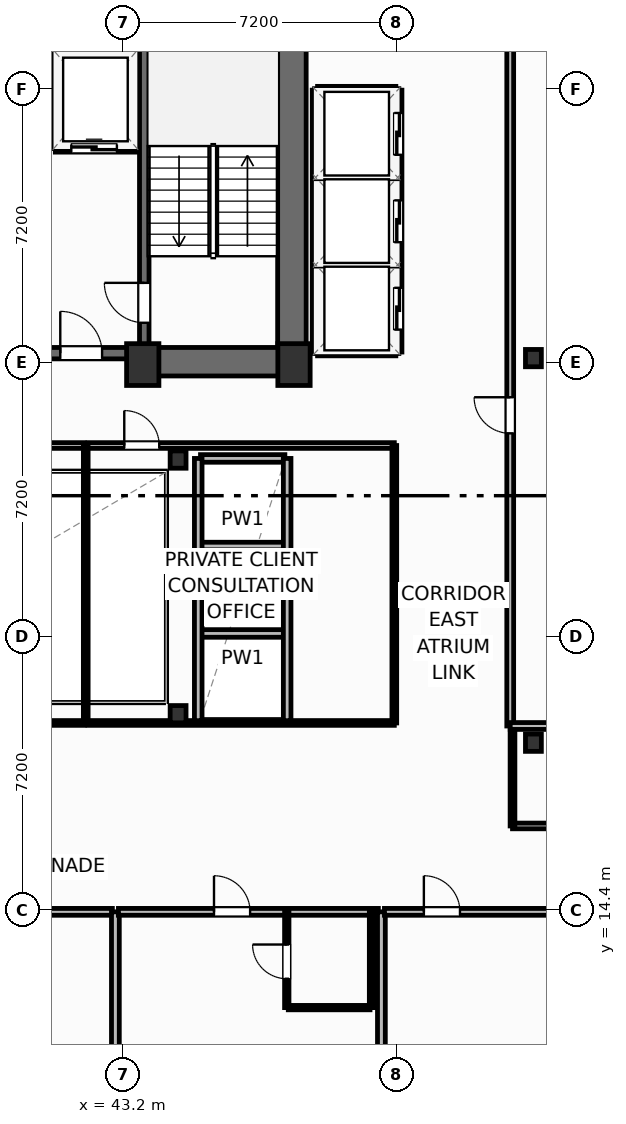
"""IFC4 building model, lengths in metres.
Left out: names, types, materials, properties, quantities, classifications, styles, units other than length and angle.
Written with IfcOpenShell. Run it as: python <this file> out.ifc"""

import sys

from ifc_helpers import new_model, si_unit, direction, frame, frame_2d, origin, origin_2d, place, context, subcontext, project, spatial, rectangle, i_section, extrude, element, fill, save


model = new_model("IFC4")
c1 = context("Model", 3, precision=1e-05, world=origin(), true_north=direction((0.0, 1.0)))
c2 = subcontext(c1, "Body", "Model", "MODEL_VIEW")
j1 = project(units=[si_unit("LENGTHUNIT", "METRE"), si_unit("PLANEANGLEUNIT", "RADIAN")], contexts=[c1])
p1 = place(None, origin())
s1 = spatial("IfcSite", under=j1, at=p1, CompositionType="ELEMENT")
p2 = place(p1, origin())
s2 = spatial("IfcBuilding", under=s1, at=p2, CompositionType="ELEMENT")
p3 = place(p2, frame((0.0, 0.0, 158.7)))
s3 = spatial("IfcBuildingStorey", under=s2, at=p3, CompositionType="ELEMENT", Elevation=158.7)
for number, where, z_axis, x_axis in (
    (1, (43.72, 28.75, 0.0), (0.0, 0.0, 1.0), (1.0, 0.0, 0.0)),
    (2, (47.7, 28.75, 0.0), (0.0, 0.0, 1.0), (1.0, 0.0, 0.0)),
):
    element("IfcColumn", number, at=place(p3, frame(where, z_axis=z_axis, x_axis=x_axis)), inside=s3, PredefinedType="COLUMN", context=c2, shape_type="SweptSolid", body=[
        extrude(rectangle(XDim=0.85, YDim=1.1, at=origin_2d()), origin(), (0.0, 0.0, 1.0), 3.7),
    ])
for number, where, z_axis, x_axis in (
    (3, (44.65, 19.55, 0.0), (0.0, 0.0, 1.0), (1.0, 0.0, 0.0)),
    (4, (44.65, 26.25, 0.0), (0.0, 0.0, 1.0), (1.0, 0.0, 0.0)),
    (5, (54.0, 18.8, 0.0), (0.0, 0.0, 1.0), (1.0, 0.0, 0.0)),
    (6, (54.0, 28.92, 0.0), (0.0, 0.0, 1.0), (1.0, 0.0, 0.0)),
):
    element("IfcColumn", number, at=place(p3, frame(where, z_axis=z_axis, x_axis=x_axis)), inside=s3, PredefinedType="COLUMN", context=c2, shape_type="SweptSolid", body=[
        extrude(i_section(OverallWidth=0.418, OverallDepth=0.455, WebThickness=0.042, FlangeThickness=0.068, FilletRadius=0.025, at=origin_2d()), origin(), (0.0, 0.0, 1.0), 3.7),
    ])
p4 = place(p3, frame((47.645, 29.2, 0.0), z_axis=(0.0, 0.0, 1.0), x_axis=(0.0, 1.0, 0.0)))
e7 = element("IfcWall", 7, at=p4, inside=s3, PredefinedType="SHEAR", context=c2, shape_type="SweptSolid", body=[
    extrude(rectangle(XDim=9.22, YDim=0.75, at=frame_2d((4.61, 0.0))), origin(), (0.0, 0.0, 1.0), 3.38),
])
p5 = place(p3, frame((43.6, 28.825, 0.0), z_axis=(0.0, 0.0, 1.0), x_axis=(1.0, 0.0, 0.0)))
e8 = element("IfcWall", 8, at=p5, inside=s3, PredefinedType="SHEAR", context=c2, shape_type="SweptSolid", body=[
    extrude(rectangle(XDim=4.42, YDim=0.75, at=frame_2d((2.21, 0.0))), origin(), (0.0, 0.0, 1.0), 3.38),
])
p6 = place(p3, frame((34.8, 29.05, 0.0), z_axis=(0.0, 0.0, 1.0), x_axis=(1.0, 0.0, 0.0)))
e9 = element("IfcWall", 9, at=p6, inside=s3, PredefinedType="SHEAR", context=c2, shape_type="SweptSolid", body=[
    extrude(rectangle(XDim=8.8, YDim=0.3, at=frame_2d((4.4, 0.0))), origin(), (0.0, 0.0, 1.0), 3.38),
])
p7 = place(p6, frame((0.95, 0.0, 0.0)))
e10 = element("IfcOpeningElement", 10, at=p7, cuts=e9, PredefinedType="OPENING", context=c2, shape_type="SweptSolid", body=[
    extrude(rectangle(XDim=1.1, YDim=2.15, at=frame_2d((0.55, 1.075))), frame((0.0, 0.16, 0.0), z_axis=(0.0, -1.0, 0.0), x_axis=(1.0, 0.0, 0.0)), (0.0, 0.0, 1.0), 0.32),
])
p8 = place(p6, frame((6.75, 0.0, 0.0)))
e11 = element("IfcOpeningElement", 11, at=p8, cuts=e9, PredefinedType="OPENING", context=c2, shape_type="SweptSolid", body=[
    extrude(rectangle(XDim=1.1, YDim=2.15, at=frame_2d((0.55, 1.075))), frame((0.0, 0.16, 0.0), z_axis=(0.0, -1.0, 0.0), x_axis=(1.0, 0.0, 0.0)), (0.0, 0.0, 1.0), 0.32),
])
p9 = place(p6, frame((4.45, 0.0, 0.0)))
e12 = element("IfcOpeningElement", 12, at=p9, cuts=e9, PredefinedType="OPENING", context=c2, shape_type="SweptSolid", body=[
    extrude(rectangle(XDim=0.95, YDim=2.15, at=frame_2d((0.475, 1.075))), frame((0.0, 0.16, 0.0), z_axis=(0.0, -1.0, 0.0), x_axis=(1.0, 0.0, 0.0)), (0.0, 0.0, 1.0), 0.32),
])
p10 = place(p3, frame((43.76, 29.2, 0.0), z_axis=(0.0, 0.0, 1.0), x_axis=(0.0, 1.0, 0.0)))
e13 = element("IfcWall", 13, at=p10, inside=s3, PredefinedType="SHEAR", context=c2, shape_type="SweptSolid", body=[
    extrude(rectangle(XDim=9.22, YDim=0.25, at=frame_2d((4.61, 0.0))), origin(), (0.0, 0.0, 1.0), 3.38),
])
p11 = place(p10, frame((0.65, 0.0, 0.0)))
e14 = element("IfcOpeningElement", 14, at=p11, cuts=e13, PredefinedType="OPENING", context=c2, shape_type="SweptSolid", body=[
    extrude(rectangle(XDim=1.05, YDim=2.15, at=frame_2d((0.525, 1.075))), frame((0.0, 0.135, 0.0), z_axis=(0.0, -1.0, 0.0), x_axis=(1.0, 0.0, 0.0)), (0.0, 0.0, 1.0), 0.27),
])
p12 = place(p3, frame((33.68, 26.62, 0.0), z_axis=(0.0, 0.0, 1.0), x_axis=(1.0, 0.0, 0.0)))
e15 = element("IfcWall", 15, at=p12, inside=s3, PredefinedType="PARTITIONING", context=c2, shape_type="SweptSolid", body=[
    extrude(rectangle(XDim=8.5, YDim=0.15, at=frame_2d((4.25, 0.0))), origin(), (0.0, 0.0, 1.0), 3.38),
])
p13 = place(p12, frame((1.85, 0.0, 0.0)))
e16 = element("IfcOpeningElement", 16, at=p13, cuts=e15, PredefinedType="OPENING", context=c2, shape_type="SweptSolid", body=[
    extrude(rectangle(XDim=0.92, YDim=2.05, at=frame_2d((0.46, 1.025))), frame((0.0, 0.085, 0.0), z_axis=(0.0, -1.0, 0.0), x_axis=(1.0, 0.0, 0.0)), (0.0, 0.0, 1.0), 0.17),
])
p14 = place(p3, frame((33.68, 19.32, 0.0), z_axis=(0.0, 0.0, 1.0), x_axis=(1.0, 0.0, 0.0)))
e17 = element("IfcWall", 17, at=p14, inside=s3, PredefinedType="PARTITIONING", context=c2, shape_type="SweptSolid", body=[
    extrude(rectangle(XDim=8.5, YDim=0.125, at=frame_2d((4.25, 0.0))), origin(), (0.0, 0.0, 1.0), 2.754),
])
p15 = place(p3, frame((42.22, 19.32, 0.0), z_axis=(0.0, 0.0, 1.0), x_axis=(0.0, 1.0, 0.0)))
e18 = element("IfcWall", 18, at=p15, inside=s3, PredefinedType="PARTITIONING", context=c2, shape_type="SweptSolid", body=[
    extrude(rectangle(XDim=7.3, YDim=0.125, at=frame_2d((3.65, 0.0))), origin(), (0.0, 0.0, 1.0), 3.38),
])
p16 = place(p3, frame((42.28, 26.62, 0.0), z_axis=(0.0, 0.0, 1.0), x_axis=(1.0, 0.0, 0.0)))
e19 = element("IfcWall", 19, at=p16, inside=s3, PredefinedType="PARTITIONING", context=c2, shape_type="SweptSolid", body=[
    extrude(rectangle(XDim=8.06, YDim=0.15, at=frame_2d((4.03, 0.0))), origin(), (0.0, 0.0, 1.0), 3.38),
])
p17 = place(p16, frame((0.954, 0.0, 0.0)))
e20 = element("IfcOpeningElement", 20, at=p17, cuts=e19, PredefinedType="OPENING", context=c2, shape_type="SweptSolid", body=[
    extrude(rectangle(XDim=0.92, YDim=2.05, at=frame_2d((0.46, 1.025))), frame((0.0, 0.085, 0.0), z_axis=(0.0, -1.0, 0.0), x_axis=(1.0, 0.0, 0.0)), (0.0, 0.0, 1.0), 0.17),
])
p18 = place(p3, frame((42.28, 19.32, 0.0), z_axis=(0.0, 0.0, 1.0), x_axis=(1.0, 0.0, 0.0)))
e21 = element("IfcWall", 21, at=p18, inside=s3, PredefinedType="PARTITIONING", context=c2, shape_type="SweptSolid", body=[
    extrude(rectangle(XDim=8.06, YDim=0.125, at=frame_2d((4.03, 0.0))), origin(), (0.0, 0.0, 1.0), 2.592),
])
p19 = place(p3, frame((50.34, 19.32, 0.0), z_axis=(0.0, 0.0, 1.0), x_axis=(0.0, 1.0, 0.0)))
e22 = element("IfcWall", 22, at=p19, inside=s3, PredefinedType="PARTITIONING", context=c2, shape_type="SweptSolid", body=[
    extrude(rectangle(XDim=7.3, YDim=0.125, at=frame_2d((3.65, 0.0))), origin(), (0.0, 0.0, 1.0), 3.38),
])
p20 = place(p3, frame((53.45, 16.61, 0.0), z_axis=(0.0, 0.0, 1.0), x_axis=(1.0, 0.0, 0.0)))
e23 = element("IfcWall", 23, at=p20, inside=s3, PredefinedType="PARTITIONING", context=c2, shape_type="SweptSolid", body=[
    extrude(rectangle(XDim=16.55, YDim=0.15, at=frame_2d((8.275, 0.0))), origin(), (0.0, 0.0, 1.0), 3.38),
])
p21 = place(p20, frame((2.61, 0.0, 0.0)))
e24 = element("IfcOpeningElement", 24, at=p21, cuts=e23, PredefinedType="OPENING", context=c2, shape_type="SweptSolid", body=[
    extrude(rectangle(XDim=0.92, YDim=2.05, at=frame_2d((0.46, 1.025))), frame((0.0, 0.085, 0.0), z_axis=(0.0, -1.0, 0.0), x_axis=(1.0, 0.0, 0.0)), (0.0, 0.0, 1.0), 0.17),
])
p22 = place(p3, frame((53.45, 16.61, 0.0), z_axis=(0.0, 0.0, 1.0), x_axis=(0.0, 1.0, 0.0)))
e25 = element("IfcWall", 25, at=p22, inside=s3, PredefinedType="PARTITIONING", context=c2, shape_type="SweptSolid", body=[
    extrude(rectangle(XDim=2.63, YDim=0.125, at=frame_2d((1.315, 0.0))), origin(), (0.0, 0.0, 1.0), 1.165),
])
p23 = place(p3, frame((36.08, 14.35, 0.0), z_axis=(0.0, 0.0, 1.0), x_axis=(1.0, 0.0, 0.0)))
e26 = element("IfcWall", 26, at=p23, inside=s3, PredefinedType="PARTITIONING", context=c2, shape_type="SweptSolid", body=[
    extrude(rectangle(XDim=6.84, YDim=0.18, at=frame_2d((3.42, 0.0))), origin(), (0.0, 0.0, 1.0), 3.38),
])
p24 = place(p23, frame((3.29, 0.0, 0.0)))
e27 = element("IfcOpeningElement", 27, at=p24, cuts=e26, PredefinedType="OPENING", context=c2, shape_type="SweptSolid", body=[
    extrude(rectangle(XDim=0.95, YDim=2.15, at=frame_2d((0.475, 1.075))), frame((0.0, 0.1, 0.0), z_axis=(0.0, -1.0, 0.0), x_axis=(1.0, 0.0, 0.0)), (0.0, 0.0, 1.0), 0.2),
])
p25 = place(p3, frame((43.0, 2.934, 0.0), z_axis=(0.0, 0.0, 1.0), x_axis=(0.0, 1.0, 0.0)))
e28 = element("IfcWall", 28, at=p25, inside=s3, PredefinedType="PARTITIONING", context=c2, shape_type="SweptSolid", body=[
    extrude(rectangle(XDim=11.416, YDim=0.205, at=frame_2d((5.708, 0.0))), origin(), (0.0, 0.0, 1.0), 1.165),
])
p26 = place(p3, frame((43.08, 14.35, 0.0), z_axis=(0.0, 0.0, 1.0), x_axis=(1.0, 0.0, 0.0)))
e29 = element("IfcWall", 29, at=p26, inside=s3, PredefinedType="PARTITIONING", context=c2, shape_type="SweptSolid", body=[
    extrude(rectangle(XDim=6.84, YDim=0.18, at=frame_2d((3.42, 0.0))), origin(), (0.0, 0.0, 1.0), 3.38),
])
p27 = place(p26, frame((2.515, 0.0, 0.0)))
e30 = element("IfcOpeningElement", 30, at=p27, cuts=e29, PredefinedType="OPENING", context=c2, shape_type="SweptSolid", body=[
    extrude(rectangle(XDim=0.95, YDim=2.15, at=frame_2d((0.475, 1.075))), frame((0.0, 0.1, 0.0), z_axis=(0.0, -1.0, 0.0), x_axis=(1.0, 0.0, 0.0)), (0.0, 0.0, 1.0), 0.2),
])
p28 = place(p3, frame((47.55, 11.83, 0.0), z_axis=(0.0, 0.0, 1.0), x_axis=(1.0, 0.0, 0.0)))
e31 = element("IfcWall", 31, at=p28, inside=s3, PredefinedType="PARTITIONING", context=c2, shape_type="SweptSolid", body=[
    extrude(rectangle(XDim=2.15, YDim=0.115, at=frame_2d((1.075, 0.0))), origin(), (0.0, 0.0, 1.0), 3.38),
])
p29 = place(p3, frame((47.51, 11.83, 0.0), z_axis=(0.0, 0.0, 1.0), x_axis=(0.0, 1.0, 0.0)))
e32 = element("IfcWall", 32, at=p29, inside=s3, PredefinedType="PARTITIONING", context=c2, shape_type="SweptSolid", body=[
    extrude(rectangle(XDim=2.52, YDim=0.115, at=frame_2d((1.26, 0.0))), origin(), (0.0, 0.0, 1.0), 3.38),
])
p30 = place(p29, frame((0.76, 0.0, 0.0)))
e33 = element("IfcOpeningElement", 33, at=p30, cuts=e32, PredefinedType="OPENING", context=c2, shape_type="SweptSolid", body=[
    extrude(rectangle(XDim=0.9, YDim=2.05, at=frame_2d((0.45, 1.025))), frame((0.0, 0.067, 0.0), z_axis=(0.0, -1.0, 0.0), x_axis=(1.0, 0.0, 0.0)), (0.0, 0.0, 1.0), 0.135),
])
p31 = place(p3, frame((49.74, 11.83, 0.0), z_axis=(0.0, 0.0, 1.0), x_axis=(0.0, 1.0, 0.0)))
e34 = element("IfcWall", 34, at=p31, inside=s3, PredefinedType="PARTITIONING", context=c2, shape_type="SweptSolid", body=[
    extrude(rectangle(XDim=2.52, YDim=0.115, at=frame_2d((1.26, 0.0))), origin(), (0.0, 0.0, 1.0), 3.38),
])
p32 = place(p3, frame((50.0, 0.561, 0.0), z_axis=(0.0, 0.0, 1.0), x_axis=(0.0, 1.0, 0.0)))
e35 = element("IfcWall", 35, at=p32, inside=s3, PredefinedType="PARTITIONING", context=c2, shape_type="SweptSolid", body=[
    extrude(rectangle(XDim=13.79, YDim=0.205, at=frame_2d((6.895, 0.0))), origin(), (0.0, 0.0, 1.0), 1.165),
])
p33 = place(p3, frame((50.08, 14.35, 0.0), z_axis=(0.0, 0.0, 1.0), x_axis=(1.0, 0.0, 0.0)))
e36 = element("IfcWall", 36, at=p33, inside=s3, PredefinedType="PARTITIONING", context=c2, shape_type="SweptSolid", body=[
    extrude(rectangle(XDim=6.84, YDim=0.18, at=frame_2d((3.42, 0.0))), origin(), (0.0, 0.0, 1.0), 3.38),
])
p34 = place(p33, frame((1.038, 0.0, 0.0)))
e37 = element("IfcOpeningElement", 37, at=p34, cuts=e36, PredefinedType="OPENING", context=c2, shape_type="SweptSolid", body=[
    extrude(rectangle(XDim=0.95, YDim=2.05, at=frame_2d((0.475, 1.025))), frame((0.0, 0.1, 0.0), z_axis=(0.0, -1.0, 0.0), x_axis=(1.0, 0.0, 0.0)), (0.0, 0.0, 1.0), 0.2),
])
p35 = place(p3, frame((53.39, 19.24, 0.0), z_axis=(0.0, 0.0, 1.0), x_axis=(0.0, 1.0, 0.0)))
e38 = element("IfcWall", 38, at=p35, inside=s3, PredefinedType="PARTITIONING", context=c2, shape_type="SweptSolid", body=[
    extrude(rectangle(XDim=20.06, YDim=0.18, at=frame_2d((10.03, 0.0))), origin(), (0.0, 0.0, 1.0), 3.38),
])
p36 = place(p35, frame((7.7, 0.0, 0.0)))
e39 = element("IfcOpeningElement", 39, at=p36, cuts=e38, PredefinedType="OPENING", context=c2, shape_type="SweptSolid", body=[
    extrude(rectangle(XDim=0.95, YDim=2.05, at=frame_2d((0.475, 1.025))), frame((0.0, 0.1, 0.0), z_axis=(0.0, -1.0, 0.0), x_axis=(1.0, 0.0, 0.0)), (0.0, 0.0, 1.0), 0.2),
])
p37 = place(p3, frame((53.39, 19.24, 0.0), z_axis=(0.0, 0.0, 1.0), x_axis=(1.0, 0.0, 0.0)))
e40 = element("IfcWall", 40, at=p37, inside=s3, PredefinedType="PARTITIONING", context=c2, shape_type="SweptSolid", body=[
    extrude(rectangle(XDim=22.367, YDim=0.18, at=frame_2d((11.183, 0.0))), origin(), (0.0, 0.0, 1.0), 1.165),
])
p38 = place(p3, frame((41.42, 34.44, 0.0), z_axis=(0.0, 0.0, 1.0), x_axis=(1.0, 0.0, 0.0)))
e41 = element("IfcWall", 41, at=p38, inside=s3, PredefinedType="PARTITIONING", context=c2, shape_type="SweptSolid", body=[
    extrude(rectangle(XDim=2.18, YDim=0.2, at=frame_2d((1.09, 0.0))), origin(), (0.0, 0.0, 1.0), 3.38),
])
p39 = place(p38, frame((0.42, 0.0, 0.0)))
e42 = element("IfcOpeningElement", 42, at=p39, cuts=e41, PredefinedType="OPENING", context=c2, shape_type="SweptSolid", body=[
    extrude(rectangle(XDim=1.2, YDim=2.2, at=frame_2d((0.6, 1.1))), frame((0.0, 0.11, 0.0), z_axis=(0.0, -1.0, 0.0), x_axis=(1.0, 0.0, 0.0)), (0.0, 0.0, 1.0), 0.22),
])
p40 = place(p3, frame((41.42, 36.98, 0.0), z_axis=(0.0, 0.0, 1.0), x_axis=(1.0, 0.0, 0.0)))
e43 = element("IfcWall", 43, at=p40, inside=s3, PredefinedType="PARTITIONING", context=c2, shape_type="SweptSolid", body=[
    extrude(rectangle(XDim=2.18, YDim=0.2, at=frame_2d((1.09, 0.0))), origin(), (0.0, 0.0, 1.0), 3.38),
])
p41 = place(p3, frame((41.4, 34.44, 0.0), z_axis=(0.0, 0.0, 1.0), x_axis=(0.0, 1.0, 0.0)))
e44 = element("IfcWall", 44, at=p41, inside=s3, PredefinedType="PARTITIONING", context=c2, shape_type="SweptSolid", body=[
    extrude(rectangle(XDim=3.9, YDim=0.2, at=frame_2d((1.95, 0.0))), origin(), (0.0, 0.0, 1.0), 3.38),
])
for number, where, z_axis, x_axis in (
    (45, (48.32, 31.375, 0.0), (0.0, 0.0, 1.0), (1.0, 0.0, 0.0)),
    (46, (48.32, 33.675, 0.0), (0.0, 0.0, 1.0), (1.0, 0.0, 0.0)),
):
    element("IfcWall", number, at=place(p3, frame(where, z_axis=z_axis, x_axis=x_axis)), inside=s3, PredefinedType="PARTITIONING", context=c2, shape_type="SweptSolid", body=[
        extrude(rectangle(XDim=2.06, YDim=0.2, at=frame_2d((1.03, 0.0))), origin(), (0.0, 0.0, 1.0), 3.38),
    ])
p42 = place(p3, frame((48.32, 29.08, 0.0), z_axis=(0.0, 0.0, 1.0), x_axis=(1.0, 0.0, 0.0)))
e47 = element("IfcWall", 47, at=p42, inside=s3, PredefinedType="PARTITIONING", context=c2, shape_type="SweptSolid", body=[
    extrude(rectangle(XDim=2.06, YDim=0.2, at=frame_2d((1.03, 0.0))), origin(), (0.0, 0.0, 1.0), 2.592),
])
p43 = place(p3, frame((48.32, 35.97, 0.0), z_axis=(0.0, 0.0, 1.0), x_axis=(1.0, 0.0, 0.0)))
e48 = element("IfcWall", 48, at=p43, inside=s3, PredefinedType="PARTITIONING", context=c2, shape_type="SweptSolid", body=[
    extrude(rectangle(XDim=2.06, YDim=0.2, at=frame_2d((1.03, 0.0))), origin(), (0.0, 0.0, 1.0), 3.38),
])
p44 = place(p3, frame((48.28, 29.08, 0.0), z_axis=(0.0, 0.0, 1.0), x_axis=(0.0, 1.0, 0.0)))
e49 = element("IfcWall", 49, at=p44, inside=s3, PredefinedType="PARTITIONING", context=c2, shape_type="SweptSolid", body=[
    extrude(rectangle(XDim=6.89, YDim=0.2, at=frame_2d((3.445, 0.0))), origin(), (0.0, 0.0, 1.0), 3.38),
])
p45 = place(p3, frame((50.44, 29.08, 0.0), z_axis=(0.0, 0.0, 1.0), x_axis=(0.0, 1.0, 0.0)))
e50 = element("IfcWall", 50, at=p45, inside=s3, PredefinedType="PARTITIONING", context=c2, shape_type="SweptSolid", body=[
    extrude(rectangle(XDim=6.89, YDim=0.2, at=frame_2d((3.445, 0.0))), origin(), (0.0, 0.0, 1.0), 3.38),
])
p46 = place(p45, frame((0.59, 0.0, 0.0)))
e51 = element("IfcOpeningElement", 51, at=p46, cuts=e50, PredefinedType="OPENING", context=c2, shape_type="SweptSolid", body=[
    extrude(rectangle(XDim=1.1, YDim=2.15, at=frame_2d((0.55, 1.075))), frame((0.0, 0.11, 0.0), z_axis=(0.0, -1.0, 0.0), x_axis=(1.0, 0.0, 0.0)), (0.0, 0.0, 1.0), 0.22),
])
p47 = place(p45, frame((2.89, 0.0, 0.0)))
e52 = element("IfcOpeningElement", 52, at=p47, cuts=e50, PredefinedType="OPENING", context=c2, shape_type="SweptSolid", body=[
    extrude(rectangle(XDim=1.1, YDim=2.15, at=frame_2d((0.55, 1.075))), frame((0.0, 0.11, 0.0), z_axis=(0.0, -1.0, 0.0), x_axis=(1.0, 0.0, 0.0)), (0.0, 0.0, 1.0), 0.22),
])
p48 = place(p45, frame((5.19, 0.0, 0.0)))
e53 = element("IfcOpeningElement", 53, at=p48, cuts=e50, PredefinedType="OPENING", context=c2, shape_type="SweptSolid", body=[
    extrude(rectangle(XDim=1.1, YDim=2.15, at=frame_2d((0.55, 1.075))), frame((0.0, 0.11, 0.0), z_axis=(0.0, -1.0, 0.0), x_axis=(1.0, 0.0, 0.0)), (0.0, 0.0, 1.0), 0.22),
])
for number, where, z_axis, x_axis in (
    (54, (45.24, 21.675, 0.0), (0.0, 0.0, 1.0), (1.0, 0.0, 0.0)),
    (55, (45.24, 23.975, 0.0), (0.0, 0.0, 1.0), (1.0, 0.0, 0.0)),
    (56, (45.24, 26.28, 0.0), (0.0, 0.0, 1.0), (1.0, 0.0, 0.0)),
):
    element("IfcWall", number, at=place(p3, frame(where, z_axis=z_axis, x_axis=x_axis)), inside=s3, PredefinedType="PARTITIONING", context=c2, shape_type="SweptSolid", body=[
        extrude(rectangle(XDim=2.22, YDim=0.2, at=frame_2d((1.11, 0.0))), origin(), (0.0, 0.0, 1.0), 3.38),
    ])
for number, where, z_axis, x_axis in (
    (57, (45.18, 19.38, 0.0), (0.0, 0.0, 1.0), (0.0, 1.0, 0.0)),
    (58, (47.52, 19.38, 0.0), (0.0, 0.0, 1.0), (0.0, 1.0, 0.0)),
):
    element("IfcWall", number, at=place(p3, frame(where, z_axis=z_axis, x_axis=x_axis)), inside=s3, PredefinedType="PARTITIONING", context=c2, shape_type="SweptSolid", body=[
        extrude(rectangle(XDim=6.9, YDim=0.2, at=frame_2d((3.45, 0.0))), origin(), (0.0, 0.0, 1.0), 3.38),
    ])
p49 = place(p17, origin())
e59 = element("IfcDoor", 59, at=p49, inside=s3, OperationType="SINGLE_SWING_LEFT", PredefinedType="DOOR", context=c2, shape_type="SweptSolid", body=[
    extrude(rectangle(XDim=0.92, YDim=2.05, at=frame_2d((0.46, 1.025))), frame((0.0, 0.025, 0.0), z_axis=(0.0, -1.0, 0.0), x_axis=(1.0, 0.0, 0.0)), (0.0, 0.0, 1.0), 0.05),
])
fill(e20, e59)
p50 = place(p27, origin())
e60 = element("IfcDoor", 60, at=p50, inside=s3, OperationType="SINGLE_SWING_LEFT", PredefinedType="DOOR", context=c2, shape_type="SweptSolid", body=[
    extrude(rectangle(XDim=0.95, YDim=2.15, at=frame_2d((0.475, 1.075))), frame((0.0, 0.025, 0.0), z_axis=(0.0, -1.0, 0.0), x_axis=(1.0, 0.0, 0.0)), (0.0, 0.0, 1.0), 0.05),
])
fill(e30, e60)
p51 = place(p30, origin())
e61 = element("IfcDoor", 61, at=p51, inside=s3, OperationType="SINGLE_SWING_RIGHT", PredefinedType="DOOR", context=c2, shape_type="SweptSolid", body=[
    extrude(rectangle(XDim=0.9, YDim=2.05, at=frame_2d((0.45, 1.025))), frame((0.0, 0.025, 0.0), z_axis=(0.0, -1.0, 0.0), x_axis=(1.0, 0.0, 0.0)), (0.0, 0.0, 1.0), 0.05),
])
fill(e33, e61)
p52 = place(p34, origin())
e62 = element("IfcDoor", 62, at=p52, inside=s3, OperationType="SINGLE_SWING_LEFT", PredefinedType="DOOR", context=c2, shape_type="SweptSolid", body=[
    extrude(rectangle(XDim=0.95, YDim=2.05, at=frame_2d((0.475, 1.025))), frame((0.0, 0.025, 0.0), z_axis=(0.0, -1.0, 0.0), x_axis=(1.0, 0.0, 0.0)), (0.0, 0.0, 1.0), 0.05),
])
fill(e37, e62)
p53 = place(p36, origin())
e63 = element("IfcDoor", 63, at=p53, inside=s3, OperationType="SINGLE_SWING_RIGHT", PredefinedType="DOOR", context=c2, shape_type="SweptSolid", body=[
    extrude(rectangle(XDim=0.95, YDim=2.05, at=frame_2d((0.475, 1.025))), frame((0.0, 0.025, 0.0), z_axis=(0.0, -1.0, 0.0), x_axis=(1.0, 0.0, 0.0)), (0.0, 0.0, 1.0), 0.05),
])
fill(e39, e63)
p54 = place(p11, origin())
e64 = element("IfcDoor", 64, at=p54, inside=s3, OperationType="SINGLE_SWING_RIGHT", PredefinedType="DOOR", context=c2, shape_type="SweptSolid", body=[
    extrude(rectangle(XDim=1.05, YDim=2.15, at=frame_2d((0.525, 1.075))), frame((0.0, 0.025, 0.0), z_axis=(0.0, -1.0, 0.0), x_axis=(1.0, 0.0, 0.0)), (0.0, 0.0, 1.0), 0.05),
])
fill(e14, e64)
p55 = place(p8, origin())
e65 = element("IfcDoor", 65, at=p55, inside=s3, OperationType="SINGLE_SWING_LEFT", PredefinedType="DOOR", context=c2, shape_type="SweptSolid", body=[
    extrude(rectangle(XDim=1.1, YDim=2.15, at=frame_2d((0.55, 1.075))), frame((0.0, 0.025, 0.0), z_axis=(0.0, -1.0, 0.0), x_axis=(1.0, 0.0, 0.0)), (0.0, 0.0, 1.0), 0.05),
])
fill(e11, e65)
p56 = place(p39, origin())
e66 = element("IfcDoor", 66, at=p56, inside=s3, OperationType="SLIDING_TO_LEFT", PredefinedType="DOOR", context=c2, shape_type="SweptSolid", body=[
    extrude(rectangle(XDim=1.2, YDim=2.2, at=frame_2d((0.6, 1.1))), frame((0.0, 0.025, 0.0), z_axis=(0.0, -1.0, 0.0), x_axis=(1.0, 0.0, 0.0)), (0.0, 0.0, 1.0), 0.05),
])
fill(e42, e66)
p57 = place(p46, origin())
e67 = element("IfcDoor", 67, at=p57, inside=s3, OperationType="SLIDING_TO_LEFT", PredefinedType="DOOR", context=c2, shape_type="SweptSolid", body=[
    extrude(rectangle(XDim=1.1, YDim=2.15, at=frame_2d((0.55, 1.075))), frame((0.0, 0.025, 0.0), z_axis=(0.0, -1.0, 0.0), x_axis=(1.0, 0.0, 0.0)), (0.0, 0.0, 1.0), 0.05),
])
fill(e51, e67)
p58 = place(p47, origin())
e68 = element("IfcDoor", 68, at=p58, inside=s3, OperationType="SLIDING_TO_LEFT", PredefinedType="DOOR", context=c2, shape_type="SweptSolid", body=[
    extrude(rectangle(XDim=1.1, YDim=2.15, at=frame_2d((0.55, 1.075))), frame((0.0, 0.025, 0.0), z_axis=(0.0, -1.0, 0.0), x_axis=(1.0, 0.0, 0.0)), (0.0, 0.0, 1.0), 0.05),
])
fill(e52, e68)
p59 = place(p48, origin())
e69 = element("IfcDoor", 69, at=p59, inside=s3, OperationType="SLIDING_TO_LEFT", PredefinedType="DOOR", context=c2, shape_type="SweptSolid", body=[
    extrude(rectangle(XDim=1.1, YDim=2.15, at=frame_2d((0.55, 1.075))), frame((0.0, 0.025, 0.0), z_axis=(0.0, -1.0, 0.0), x_axis=(1.0, 0.0, 0.0)), (0.0, 0.0, 1.0), 0.05),
])
fill(e53, e69)
save(model, sys.argv[1])
